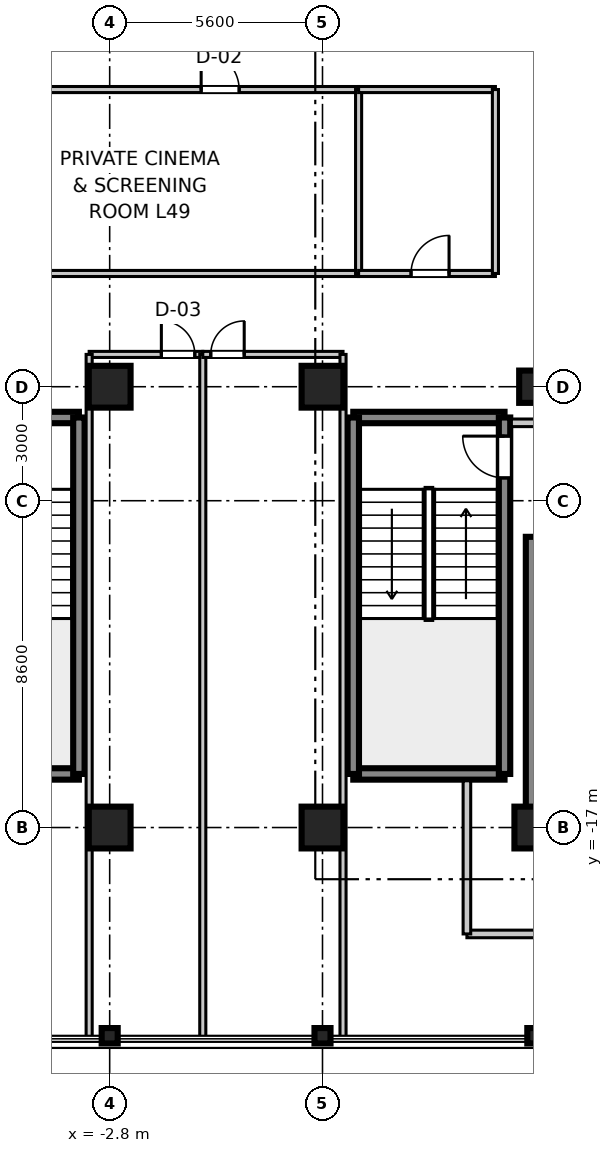
"""IFC4 building model, lengths in metres.
Left out: names, types, materials, properties, quantities, classifications, styles, units other than length and angle.
Written with IfcOpenShell. Run it as: python <this file> out.ifc"""

import sys

from ifc_helpers import new_model, si_unit, direction, frame, frame_2d, origin, origin_2d, place, context, subcontext, project, spatial, rectangle, i_section, extrude, source, transform, mapped, element, fill, save


model = new_model("IFC4")
c1 = context("Model", 3, precision=1e-05, world=origin(), true_north=direction((0.0, 1.0)))
c2 = subcontext(c1, "Body", "Model", "MODEL_VIEW")
j1 = project(units=[si_unit("LENGTHUNIT", "METRE"), si_unit("PLANEANGLEUNIT", "RADIAN")], contexts=[c1])
p1 = place(None, origin())
s1 = spatial("IfcSite", under=j1, at=p1, CompositionType="ELEMENT")
p2 = place(p1, origin())
s2 = spatial("IfcBuilding", under=s1, at=p2, CompositionType="ELEMENT")
p3 = place(p2, frame((0.0, 0.0, 192.8)))
s3 = spatial("IfcBuildingStorey", under=s2, at=p3, CompositionType="ELEMENT", Elevation=192.8)
m1 = source(origin(), c2, "Body", "SweptSolid", [
    extrude(rectangle(XDim=1.1, YDim=1.1, at=origin_2d()), origin(), (0.0, 0.0, 1.0), 3.605),
])
for number, where, z_axis, x_axis in (
    (1, (-2.8, -17.0, 0.0), (0.0, 0.0, 1.0), (1.0, 0.0, 0.0)),
    (2, (-2.8, -5.4, 0.0), (0.0, 0.0, 1.0), (1.0, 0.0, 0.0)),
    (3, (2.8, -17.0, 0.0), (0.0, 0.0, 1.0), (1.0, 0.0, 0.0)),
    (4, (2.8, -5.4, 0.0), (0.0, 0.0, 1.0), (1.0, 0.0, 0.0)),
    (5, (8.4, -17.0, 0.0), (0.0, 0.0, 1.0), (1.0, 0.0, 0.0)),
):
    element("IfcColumn", number, at=place(p3, frame(where, z_axis=z_axis, x_axis=x_axis)), inside=s3, PredefinedType="COLUMN", context=c2, shape_type="MappedRepresentation", body=[
        mapped(m1, transform((0.0, 0.0, 0.0), scale=1.0)),
    ])
m2 = source(origin(), c2, "Body", "SweptSolid", [
    extrude(rectangle(XDim=0.85, YDim=0.85, at=origin_2d()), origin(), (0.0, 0.0, 1.0), 3.605),
])
p4 = place(p3, frame((8.4, -5.4, 0.0), z_axis=(0.0, 0.0, 1.0), x_axis=(1.0, 0.0, 0.0)))
e6 = element("IfcColumn", 6, at=p4, inside=s3, PredefinedType="PILASTER", context=c2, shape_type="MappedRepresentation", body=[
    mapped(m2, transform((0.0, 0.0, 0.0), scale=1.0)),
])
m3 = source(origin(), c2, "Body", "SweptSolid", [
    extrude(i_section(OverallWidth=0.406, OverallDepth=0.422, WebThickness=0.019, FlangeThickness=0.03, at=origin_2d()), origin(), (0.0, 0.0, 1.0), 3.605),
])
for number, where, z_axis, x_axis in (
    (7, (-2.8, -22.48, 0.0), (0.0, 0.0, 1.0), (0.0, 1.0, 0.0)),
    (8, (2.8, -22.48, 0.0), (0.0, 0.0, 1.0), (0.0, 1.0, 0.0)),
    (9, (8.4, -22.48, 0.0), (0.0, 0.0, 1.0), (0.0, 1.0, 0.0)),
):
    element("IfcColumn", number, at=place(p3, frame(where, z_axis=z_axis, x_axis=x_axis)), inside=s3, PredefinedType="COLUMN", context=c2, shape_type="MappedRepresentation", body=[
        mapped(m3, transform((0.0, 0.0, 0.0), scale=1.0)),
    ])
m4 = source(origin(), c2, "Body", "SweptSolid", [
    extrude(rectangle(XDim=7.65, YDim=0.5, at=frame_2d((3.825, 0.0))), origin(), (0.0, 0.0, 1.0), 3.39),
])
p5 = place(p3, frame((8.4, -17.0, 0.0), z_axis=(0.0, 0.0, 1.0), x_axis=(0.0, 1.0, 0.0)))
e10 = element("IfcWall", 10, at=p5, inside=s3, PredefinedType="SHEAR", context=c2, shape_type="MappedRepresentation", body=[
    mapped(m4, transform((0.0, 0.0, 0.0), scale=1.0)),
])
m5 = source(origin(), c2, "Body", "SweptSolid", [
    extrude(rectangle(XDim=3.98, YDim=0.3, at=frame_2d((1.99, 0.0))), origin(), (0.0, 0.0, 1.0), 3.39),
])
for number, where, z_axis, x_axis in (
    (11, (3.61, -15.59, 0.0), (0.0, 0.0, 1.0), (1.0, 0.0, 0.0)),
    (12, (3.61, -6.21, 0.0), (0.0, 0.0, 1.0), (1.0, 0.0, 0.0)),
):
    element("IfcWall", number, at=place(p3, frame(where, z_axis=z_axis, x_axis=x_axis)), inside=s3, PredefinedType="SHEAR", context=c2, shape_type="MappedRepresentation", body=[
        mapped(m5, transform((0.0, 0.0, 0.0), scale=1.0)),
    ])
m6 = source(origin(), c2, "Body", "SweptSolid", [
    extrude(rectangle(XDim=9.38, YDim=0.3, at=frame_2d((4.69, 0.0))), origin(), (0.0, 0.0, 1.0), 3.39),
])
p6 = place(p3, frame((3.61, -15.59, 0.0), z_axis=(0.0, 0.0, 1.0), x_axis=(0.0, 1.0, 0.0)))
e13 = element("IfcWall", 13, at=p6, inside=s3, PredefinedType="SHEAR", context=c2, shape_type="MappedRepresentation", body=[
    mapped(m6, transform((0.0, 0.0, 0.0), scale=1.0)),
])
p7 = place(p3, frame((7.59, -15.59, 0.0), z_axis=(0.0, 0.0, 1.0), x_axis=(0.0, 1.0, 0.0)))
e14 = element("IfcWall", 14, at=p7, inside=s3, PredefinedType="SHEAR", context=c2, shape_type="MappedRepresentation", body=[
    mapped(m6, transform((0.0, 0.0, 0.0), scale=1.0)),
])
p8 = place(p7, frame((7.79, 0.0, 0.0)))
e15 = element("IfcOpeningElement", 15, at=p8, cuts=e14, PredefinedType="OPENING", context=c2, shape_type="SweptSolid", body=[
    extrude(rectangle(XDim=1.1, YDim=2.15, at=frame_2d((0.55, 1.075))), frame((0.0, 0.16, 0.0), z_axis=(0.0, -1.0, 0.0), x_axis=(1.0, 0.0, 0.0)), (0.0, 0.0, 1.0), 0.32),
])
p9 = place(p3, frame((-7.59, -15.59, 0.0), z_axis=(0.0, 0.0, 1.0), x_axis=(1.0, 0.0, 0.0)))
e16 = element("IfcWall", 16, at=p9, inside=s3, PredefinedType="SHEAR", context=c2, shape_type="MappedRepresentation", body=[
    mapped(m5, transform((0.0, 0.0, 0.0), scale=1.0)),
])
p10 = place(p3, frame((-7.59, -6.21, 0.0), z_axis=(0.0, 0.0, 1.0), x_axis=(1.0, 0.0, 0.0)))
e17 = element("IfcWall", 17, at=p10, inside=s3, PredefinedType="SHEAR", context=c2, shape_type="MappedRepresentation", body=[
    mapped(m5, transform((0.0, 0.0, 0.0), scale=1.0)),
])
p11 = place(p10, frame((1.44, 0.0, 0.0)))
e18 = element("IfcOpeningElement", 18, at=p11, cuts=e17, PredefinedType="OPENING", context=c2, shape_type="SweptSolid", body=[
    extrude(rectangle(XDim=1.1, YDim=2.15, at=frame_2d((0.55, 1.075))), frame((0.0, 0.16, 0.0), z_axis=(0.0, -1.0, 0.0), x_axis=(1.0, 0.0, 0.0)), (0.0, 0.0, 1.0), 0.32),
])
p12 = place(p3, frame((-3.61, -15.59, 0.0), z_axis=(0.0, 0.0, 1.0), x_axis=(0.0, 1.0, 0.0)))
e19 = element("IfcWall", 19, at=p12, inside=s3, PredefinedType="SHEAR", context=c2, shape_type="MappedRepresentation", body=[
    mapped(m6, transform((0.0, 0.0, 0.0), scale=1.0)),
])
m7 = source(origin(), c2, "Body", "SweptSolid", [
    extrude(rectangle(XDim=5.82, YDim=0.2, at=frame_2d((2.91, 0.0))), origin(), (0.0, 0.0, 1.0), 2.73),
])
p13 = place(p3, frame((6.6, -19.8, 0.0), z_axis=(0.0, 0.0, 1.0), x_axis=(1.0, 0.0, 0.0)))
e20 = element("IfcWall", 20, at=p13, inside=s3, PredefinedType="PARTITIONING", context=c2, shape_type="MappedRepresentation", body=[
    mapped(m7, transform((0.0, 0.0, 0.0), scale=1.0)),
])
m8 = source(origin(), c2, "Body", "SweptSolid", [
    extrude(rectangle(XDim=4.03, YDim=0.2, at=frame_2d((2.015, 0.0))), origin(), (0.0, 0.0, 1.0), 2.73),
])
p14 = place(p3, frame((6.6, -19.8, 0.0), z_axis=(0.0, 0.0, 1.0), x_axis=(0.0, 1.0, 0.0)))
e21 = element("IfcWall", 21, at=p14, inside=s3, PredefinedType="PARTITIONING", context=c2, shape_type="MappedRepresentation", body=[
    mapped(m8, transform((0.0, 0.0, 0.0), scale=1.0)),
])
m9 = source(origin(), c2, "Body", "SweptSolid", [
    extrude(rectangle(XDim=0.97, YDim=0.2, at=frame_2d((0.485, 0.0))), origin(), (0.0, 0.0, 1.0), 2.73),
])
p15 = place(p3, frame((7.77, -6.35, 0.0), z_axis=(0.0, 0.0, 1.0), x_axis=(1.0, 0.0, 0.0)))
e22 = element("IfcWall", 22, at=p15, inside=s3, PredefinedType="PARTITIONING", context=c2, shape_type="MappedRepresentation", body=[
    mapped(m9, transform((0.0, 0.0, 0.0), scale=1.0)),
])
m10 = source(origin(), c2, "Body", "SweptSolid", [
    extrude(rectangle(XDim=2.99, YDim=0.16, at=frame_2d((1.495, 0.0))), origin(), (0.0, 0.0, 1.0), 2.73),
])
p16 = place(p3, frame((-3.34, -4.55, 0.0), z_axis=(0.0, 0.0, 1.0), x_axis=(1.0, 0.0, 0.0)))
e23 = element("IfcWall", 23, at=p16, inside=s3, PredefinedType="PARTITIONING", context=c2, shape_type="MappedRepresentation", body=[
    mapped(m10, transform((0.0, 0.0, 0.0), scale=1.0)),
])
p17 = place(p16, frame((1.9, 0.0, 0.0)))
e24 = element("IfcOpeningElement", 24, at=p17, cuts=e23, PredefinedType="OPENING", context=c2, shape_type="SweptSolid", body=[
    extrude(rectangle(XDim=0.88, YDim=2.1, at=frame_2d((0.44, 1.05))), frame((0.0, 0.09, 0.0), z_axis=(0.0, -1.0, 0.0), x_axis=(1.0, 0.0, 0.0)), (0.0, 0.0, 1.0), 0.18),
])
m11 = source(origin(), c2, "Body", "SweptSolid", [
    extrude(rectangle(XDim=17.95, YDim=0.16, at=frame_2d((8.975, 0.0))), origin(), (0.0, 0.0, 1.0), 2.73),
])
for number, where, z_axis, x_axis in (
    (25, (-3.34, -22.5, 0.0), (0.0, 0.0, 1.0), (0.0, 1.0, 0.0)),
    (26, (-0.35, -22.5, 0.0), (0.0, 0.0, 1.0), (0.0, 1.0, 0.0)),
):
    element("IfcWall", number, at=place(p3, frame(where, z_axis=z_axis, x_axis=x_axis)), inside=s3, PredefinedType="PARTITIONING", context=c2, shape_type="MappedRepresentation", body=[
        mapped(m11, transform((0.0, 0.0, 0.0), scale=1.0)),
    ])
m12 = source(origin(), c2, "Body", "SweptSolid", [
    extrude(rectangle(XDim=3.69, YDim=0.16, at=frame_2d((1.845, 0.0))), origin(), (0.0, 0.0, 1.0), 2.73),
])
p18 = place(p3, frame((-0.35, -4.55, 0.0), z_axis=(0.0, 0.0, 1.0), x_axis=(1.0, 0.0, 0.0)))
e27 = element("IfcWall", 27, at=p18, inside=s3, PredefinedType="PARTITIONING", context=c2, shape_type="MappedRepresentation", body=[
    mapped(m12, transform((0.0, 0.0, 0.0), scale=1.0)),
])
p19 = place(p18, frame((0.21, 0.0, 0.0)))
e28 = element("IfcOpeningElement", 28, at=p19, cuts=e27, PredefinedType="OPENING", context=c2, shape_type="SweptSolid", body=[
    extrude(rectangle(XDim=0.88, YDim=2.1, at=frame_2d((0.44, 1.05))), frame((0.0, 0.09, 0.0), z_axis=(0.0, -1.0, 0.0), x_axis=(1.0, 0.0, 0.0)), (0.0, 0.0, 1.0), 0.18),
])
p20 = place(p3, frame((3.34, -22.5, 0.0), z_axis=(0.0, 0.0, 1.0), x_axis=(0.0, 1.0, 0.0)))
e29 = element("IfcWall", 29, at=p20, inside=s3, PredefinedType="PARTITIONING", context=c2, shape_type="MappedRepresentation", body=[
    mapped(m11, transform((0.0, 0.0, 0.0), scale=1.0)),
])
m13 = source(origin(), c2, "Body", "SweptSolid", [
    extrude(rectangle(XDim=8.45, YDim=0.16, at=frame_2d((4.225, 0.0))), origin(), (0.0, 0.0, 1.0), 2.73),
])
p21 = place(p3, frame((-4.7, -2.42, 0.0), z_axis=(0.0, 0.0, 1.0), x_axis=(1.0, 0.0, 0.0)))
e30 = element("IfcWall", 30, at=p21, inside=s3, PredefinedType="PARTITIONING", context=c2, shape_type="MappedRepresentation", body=[
    mapped(m13, transform((0.0, 0.0, 0.0), scale=1.0)),
])
p22 = place(p3, frame((-4.7, 2.42, 0.0), z_axis=(0.0, 0.0, 1.0), x_axis=(1.0, 0.0, 0.0)))
e31 = element("IfcWall", 31, at=p22, inside=s3, PredefinedType="PARTITIONING", context=c2, shape_type="MappedRepresentation", body=[
    mapped(m13, transform((0.0, 0.0, 0.0), scale=1.0)),
])
p23 = place(p22, frame((4.307, 0.0, 0.0)))
e32 = element("IfcOpeningElement", 32, at=p23, cuts=e31, PredefinedType="OPENING", context=c2, shape_type="SweptSolid", body=[
    extrude(rectangle(XDim=1.0, YDim=2.1, at=frame_2d((0.5, 1.05))), frame((0.0, 0.09, 0.0), z_axis=(0.0, -1.0, 0.0), x_axis=(1.0, 0.0, 0.0)), (0.0, 0.0, 1.0), 0.18),
])
m14 = source(origin(), c2, "Body", "SweptSolid", [
    extrude(rectangle(XDim=4.84, YDim=0.16, at=frame_2d((2.42, 0.0))), origin(), (0.0, 0.0, 1.0), 2.73),
])
p24 = place(p3, frame((3.75, -2.42, 0.0), z_axis=(0.0, 0.0, 1.0), x_axis=(0.0, 1.0, 0.0)))
e33 = element("IfcWall", 33, at=p24, inside=s3, PredefinedType="PARTITIONING", context=c2, shape_type="MappedRepresentation", body=[
    mapped(m14, transform((0.0, 0.0, 0.0), scale=1.0)),
])
m15 = source(origin(), c2, "Body", "SweptSolid", [
    extrude(rectangle(XDim=3.6, YDim=0.16, at=frame_2d((1.8, 0.0))), origin(), (0.0, 0.0, 1.0), 2.73),
])
p25 = place(p3, frame((3.75, -2.42, 0.0), z_axis=(0.0, 0.0, 1.0), x_axis=(1.0, 0.0, 0.0)))
e34 = element("IfcWall", 34, at=p25, inside=s3, PredefinedType="PARTITIONING", context=c2, shape_type="MappedRepresentation", body=[
    mapped(m15, transform((0.0, 0.0, 0.0), scale=1.0)),
])
p26 = place(p25, frame((1.38, 0.0, 0.0)))
e35 = element("IfcOpeningElement", 35, at=p26, cuts=e34, PredefinedType="OPENING", context=c2, shape_type="SweptSolid", body=[
    extrude(rectangle(XDim=1.0, YDim=2.1, at=frame_2d((0.5, 1.05))), frame((0.0, 0.09, 0.0), z_axis=(0.0, -1.0, 0.0), x_axis=(1.0, 0.0, 0.0)), (0.0, 0.0, 1.0), 0.18),
])
p27 = place(p3, frame((3.75, 2.42, 0.0), z_axis=(0.0, 0.0, 1.0), x_axis=(1.0, 0.0, 0.0)))
e36 = element("IfcWall", 36, at=p27, inside=s3, PredefinedType="PARTITIONING", context=c2, shape_type="MappedRepresentation", body=[
    mapped(m15, transform((0.0, 0.0, 0.0), scale=1.0)),
])
p28 = place(p3, frame((7.35, -2.42, 0.0), z_axis=(0.0, 0.0, 1.0), x_axis=(0.0, 1.0, 0.0)))
e37 = element("IfcWall", 37, at=p28, inside=s3, PredefinedType="PARTITIONING", context=c2, shape_type="MappedRepresentation", body=[
    mapped(m14, transform((0.0, 0.0, 0.0), scale=1.0)),
])
m16 = source(origin(), c2, "Body", "SweptSolid", [
    extrude(rectangle(XDim=1.1, YDim=2.15, at=frame_2d((0.55, 1.075))), frame((0.0, 0.025, 0.0), z_axis=(0.0, -1.0, 0.0), x_axis=(1.0, 0.0, 0.0)), (0.0, 0.0, 1.0), 0.05),
])
p29 = place(p8, origin())
e38 = element("IfcDoor", 38, at=p29, inside=s3, OperationType="SINGLE_SWING_RIGHT", PredefinedType="DOOR", context=c2, shape_type="MappedRepresentation", body=[
    mapped(m16, transform((0.0, 0.0, 0.0), scale=1.0)),
])
fill(e15, e38)
m17 = source(origin(), c2, "Body", "SweptSolid", [
    extrude(rectangle(XDim=0.88, YDim=2.1, at=frame_2d((0.44, 1.05))), frame((0.0, 0.025, 0.0), z_axis=(0.0, -1.0, 0.0), x_axis=(1.0, 0.0, 0.0)), (0.0, 0.0, 1.0), 0.05),
])
p30 = place(p17, frame((0.88, 0.0, 0.0), z_axis=(0.0, 0.0, 1.0), x_axis=(-1.0, 0.0, 0.0)))
e39 = element("IfcDoor", 39, at=p30, inside=s3, OperationType="SINGLE_SWING_LEFT", PredefinedType="DOOR", context=c2, shape_type="MappedRepresentation", body=[
    mapped(m17, transform((0.0, 0.0, 0.0), scale=1.0)),
])
fill(e24, e39)
p31 = place(p19, frame((0.88, 0.0, 0.0), z_axis=(0.0, 0.0, 1.0), x_axis=(-1.0, 0.0, 0.0)))
e40 = element("IfcDoor", 40, at=p31, inside=s3, OperationType="SINGLE_SWING_RIGHT", PredefinedType="DOOR", context=c2, shape_type="MappedRepresentation", body=[
    mapped(m17, transform((0.0, 0.0, 0.0), scale=1.0)),
])
fill(e28, e40)
m18 = source(origin(), c2, "Body", "SweptSolid", [
    extrude(rectangle(XDim=1.0, YDim=2.1, at=frame_2d((0.5, 1.05))), frame((0.0, 0.025, 0.0), z_axis=(0.0, -1.0, 0.0), x_axis=(1.0, 0.0, 0.0)), (0.0, 0.0, 1.0), 0.05),
])
p32 = place(p23, frame((1.0, 0.0, 0.0), z_axis=(0.0, 0.0, 1.0), x_axis=(-1.0, 0.0, 0.0)))
e41 = element("IfcDoor", 41, at=p32, inside=s3, OperationType="SINGLE_SWING_LEFT", PredefinedType="DOOR", context=c2, shape_type="MappedRepresentation", body=[
    mapped(m18, transform((0.0, 0.0, 0.0), scale=1.0)),
])
fill(e32, e41)
p33 = place(p26, origin())
e42 = element("IfcDoor", 42, at=p33, inside=s3, OperationType="SINGLE_SWING_RIGHT", PredefinedType="DOOR", context=c2, shape_type="MappedRepresentation", body=[
    mapped(m18, transform((0.0, 0.0, 0.0), scale=1.0)),
])
fill(e35, e42)
save(model, sys.argv[1])
